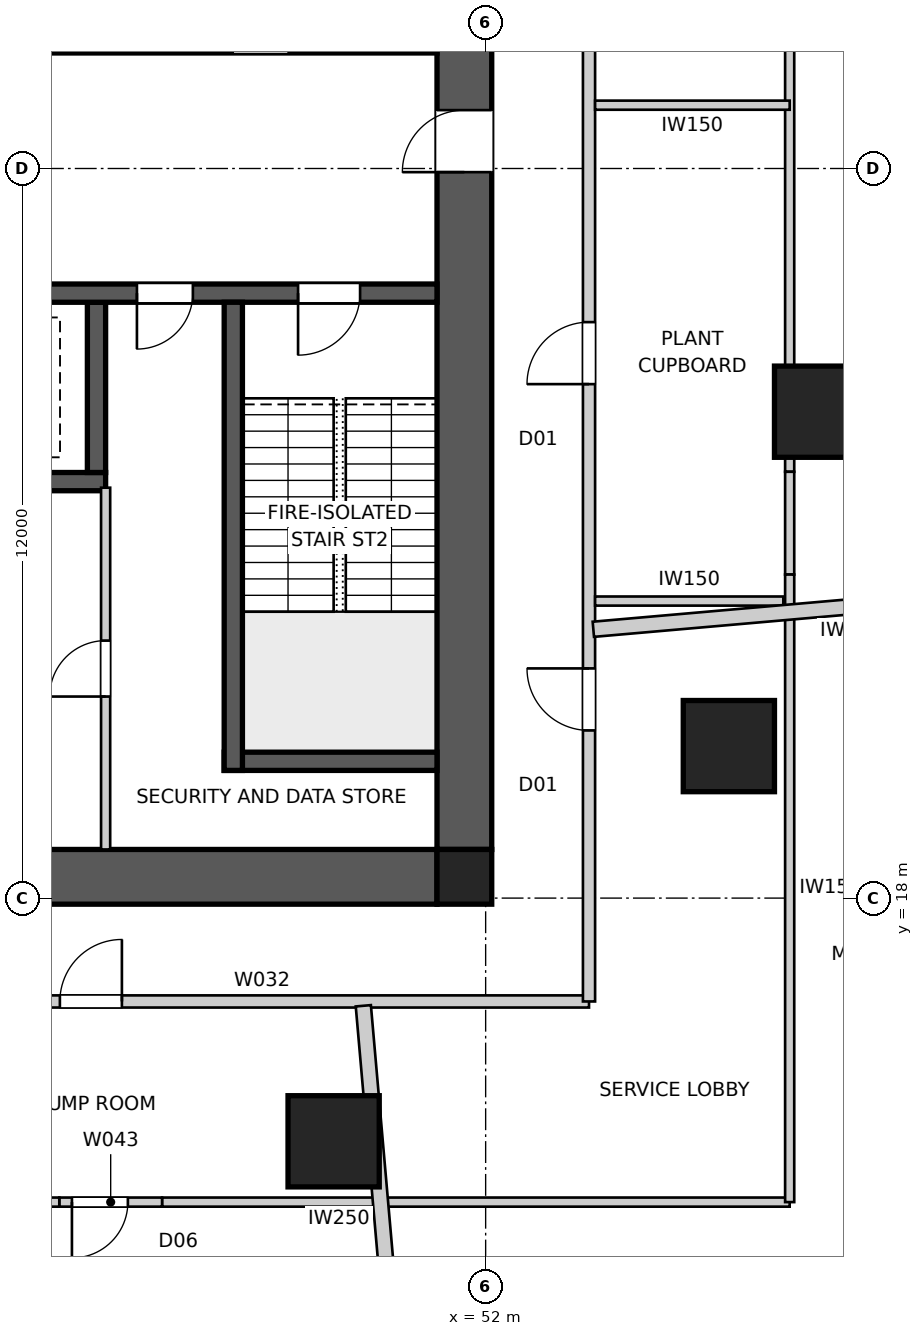
"""IFC4 building model, lengths in metres.
Left out: names, types, materials, properties, quantities, classifications, styles, units other than length and angle.
Written with IfcOpenShell. Run it as: python <this file> out.ifc"""

import sys

from ifc_helpers import new_model, si_unit, direction, frame, frame_2d, origin, origin_2d, place, context, subcontext, project, spatial, polyline, rectangle, outline, extrude, element, fill, save


model = new_model("IFC4")
c1 = context("Model", 3, precision=1e-05, world=origin(), true_north=direction((0.0, 1.0)))
c2 = subcontext(c1, "Body", "Model", "MODEL_VIEW")
j1 = project(units=[si_unit("LENGTHUNIT", "METRE"), si_unit("PLANEANGLEUNIT", "RADIAN")], contexts=[c1])
p1 = place(None, origin())
s1 = spatial("IfcSite", under=j1, at=p1, CompositionType="ELEMENT")
p2 = place(p1, origin())
s2 = spatial("IfcBuilding", under=s1, at=p2, CompositionType="ELEMENT")
p3 = place(p2, frame((0.0, 0.0, 42.2)))
s3 = spatial("IfcBuildingStorey", under=s2, at=p3, CompositionType="ELEMENT", Elevation=42.2)
p4 = place(p3, frame((51.2, 18.35, 0.0), z_axis=(0.0, 0.0, 1.0), x_axis=(-1.0, 0.0, 0.0)))
e1 = element("IfcWall", 1, at=p4, inside=s3, PredefinedType="SHEAR", context=c2, shape_type="SweptSolid", body=[
    extrude(outline(polyline([(0.0, -0.45), (22.4, -0.45), (22.4, -0.025), (22.85, -0.025), (22.85, 0.025), (22.4, 0.025), (22.4, 0.45), (0.0, 0.45), (0.0, 0.025), (-0.45, 0.025), (-0.45, -0.025), (0.0, -0.025), (0.0, -0.45)])), origin(), (0.0, 0.0, 1.0), 5.0),
])
p5 = place(p3, frame((51.65, 18.8, 0.0), z_axis=(0.0, 0.0, 1.0), x_axis=(0.0, 1.0, 0.0)))
e2 = element("IfcWall", 2, at=p5, inside=s3, PredefinedType="SHEAR", context=c2, shape_type="SweptSolid", body=[
    extrude(outline(polyline([(0.0, -0.45), (22.4, -0.45), (22.4, -0.025), (22.85, -0.025), (22.85, 0.025), (22.4, 0.025), (22.4, 0.45), (0.0, 0.45), (0.0, 0.025), (-0.45, 0.025), (-0.45, -0.025), (0.0, -0.025), (0.0, -0.45)])), origin(), (0.0, 0.0, 1.0), 5.0),
])
p6 = place(p5, frame((11.14, 0.0, 0.0)))
e3 = element("IfcOpeningElement", 3, at=p6, cuts=e2, PredefinedType="OPENING", context=c2, shape_type="SweptSolid", body=[
    extrude(rectangle(XDim=1.02, YDim=2.4, at=frame_2d((0.51, 1.2))), frame((0.0, 0.46, 0.0), z_axis=(0.0, -1.0, 0.0), x_axis=(1.0, 0.0, 0.0)), (0.0, 0.0, 1.0), 0.92),
])
p7 = place(p3, frame((28.8, 32.05, 0.0), z_axis=(0.0, 0.0, 1.0), x_axis=(1.0, 0.0, 0.0)))
e4 = element("IfcWall", 4, at=p7, inside=s3, PredefinedType="SHEAR", context=c2, shape_type="SweptSolid", body=[
    extrude(rectangle(XDim=22.4, YDim=0.3, at=frame_2d((11.2, 0.0))), origin(), (0.0, 0.0, 1.0), 5.0),
])
p8 = place(p7, frame((19.04, 0.0, 0.0)))
e5 = element("IfcOpeningElement", 5, at=p8, cuts=e4, PredefinedType="OPENING", context=c2, shape_type="SweptSolid", body=[
    extrude(rectangle(XDim=0.92, YDim=2.1, at=frame_2d((0.46, 1.05))), frame((0.0, 0.16, 0.0), z_axis=(0.0, -1.0, 0.0), x_axis=(1.0, 0.0, 0.0)), (0.0, 0.0, 1.0), 0.32),
])
p9 = place(p7, frame((1.265, 0.0, 0.0)))
e6 = element("IfcOpeningElement", 6, at=p9, cuts=e4, PredefinedType="OPENING", context=c2, shape_type="SweptSolid", body=[
    extrude(rectangle(XDim=1.02, YDim=2.1, at=frame_2d((0.51, 1.05))), frame((0.0, 0.16, 0.0), z_axis=(0.0, -1.0, 0.0), x_axis=(1.0, 0.0, 0.0)), (0.0, 0.0, 1.0), 0.32),
])
p10 = place(p7, frame((4.015, 0.0, 0.0)))
e7 = element("IfcOpeningElement", 7, at=p10, cuts=e4, PredefinedType="OPENING", context=c2, shape_type="SweptSolid", body=[
    extrude(rectangle(XDim=0.92, YDim=2.1, at=frame_2d((0.46, 1.05))), frame((0.0, 0.16, 0.0), z_axis=(0.0, -1.0, 0.0), x_axis=(1.0, 0.0, 0.0)), (0.0, 0.0, 1.0), 0.32),
])
p11 = place(p7, frame((6.45, 0.0, 0.0)))
e8 = element("IfcOpeningElement", 8, at=p11, cuts=e4, PredefinedType="OPENING", context=c2, shape_type="SweptSolid", body=[
    extrude(rectangle(XDim=1.1, YDim=2.1, at=frame_2d((0.55, 1.05))), frame((0.0, 0.16, 0.0), z_axis=(0.0, -1.0, 0.0), x_axis=(1.0, 0.0, 0.0)), (0.0, 0.0, 1.0), 0.32),
])
p12 = place(p7, frame((9.25, 0.0, 0.0)))
e9 = element("IfcOpeningElement", 9, at=p12, cuts=e4, PredefinedType="OPENING", context=c2, shape_type="SweptSolid", body=[
    extrude(rectangle(XDim=1.1, YDim=2.1, at=frame_2d((0.55, 1.05))), frame((0.0, 0.16, 0.0), z_axis=(0.0, -1.0, 0.0), x_axis=(1.0, 0.0, 0.0)), (0.0, 0.0, 1.0), 0.32),
])
p13 = place(p7, frame((14.85, 0.0, 0.0)))
e10 = element("IfcOpeningElement", 10, at=p13, cuts=e4, PredefinedType="OPENING", context=c2, shape_type="SweptSolid", body=[
    extrude(rectangle(XDim=1.1, YDim=2.1, at=frame_2d((0.55, 1.05))), frame((0.0, 0.16, 0.0), z_axis=(0.0, -1.0, 0.0), x_axis=(1.0, 0.0, 0.0)), (0.0, 0.0, 1.0), 0.32),
])
p14 = place(p3, frame((51.2, 27.95, 0.0), z_axis=(0.0, 0.0, 1.0), x_axis=(-1.0, 0.0, 0.0)))
e11 = element("IfcWall", 11, at=p14, inside=s3, PredefinedType="SHEAR", context=c2, shape_type="SweptSolid", body=[
    extrude(rectangle(XDim=22.4, YDim=0.3, at=frame_2d((11.2, 0.0))), origin(), (0.0, 0.0, 1.0), 5.0),
])
p15 = place(p14, frame((19.04, 0.0, 0.0)))
e12 = element("IfcOpeningElement", 12, at=p15, cuts=e11, PredefinedType="OPENING", context=c2, shape_type="SweptSolid", body=[
    extrude(rectangle(XDim=0.92, YDim=2.1, at=frame_2d((0.46, 1.05))), frame((0.0, 0.16, 0.0), z_axis=(0.0, -1.0, 0.0), x_axis=(1.0, 0.0, 0.0)), (0.0, 0.0, 1.0), 0.32),
])
p16 = place(p14, frame((1.265, 0.0, 0.0)))
e13 = element("IfcOpeningElement", 13, at=p16, cuts=e11, PredefinedType="OPENING", context=c2, shape_type="SweptSolid", body=[
    extrude(rectangle(XDim=1.02, YDim=2.1, at=frame_2d((0.51, 1.05))), frame((0.0, 0.16, 0.0), z_axis=(0.0, -1.0, 0.0), x_axis=(1.0, 0.0, 0.0)), (0.0, 0.0, 1.0), 0.32),
])
p17 = place(p14, frame((4.015, 0.0, 0.0)))
e14 = element("IfcOpeningElement", 14, at=p17, cuts=e11, PredefinedType="OPENING", context=c2, shape_type="SweptSolid", body=[
    extrude(rectangle(XDim=0.92, YDim=2.1, at=frame_2d((0.46, 1.05))), frame((0.0, 0.16, 0.0), z_axis=(0.0, -1.0, 0.0), x_axis=(1.0, 0.0, 0.0)), (0.0, 0.0, 1.0), 0.32),
])
p18 = place(p14, frame((14.85, 0.0, 0.0)))
e15 = element("IfcOpeningElement", 15, at=p18, cuts=e11, PredefinedType="OPENING", context=c2, shape_type="SweptSolid", body=[
    extrude(rectangle(XDim=1.1, YDim=2.1, at=frame_2d((0.55, 1.05))), frame((0.0, 0.16, 0.0), z_axis=(0.0, -1.0, 0.0), x_axis=(1.0, 0.0, 0.0)), (0.0, 0.0, 1.0), 0.32),
])
p19 = place(p3, frame((45.75, 24.85, 0.0), z_axis=(0.0, 0.0, 1.0), x_axis=(-1.0, 0.0, 0.0)))
e16 = element("IfcWall", 16, at=p19, inside=s3, PredefinedType="SHEAR", context=c2, shape_type="SweptSolid", body=[
    extrude(rectangle(XDim=11.5, YDim=0.3, at=frame_2d((5.75, 0.0))), origin(), (0.0, 0.0, 1.0), 5.0),
])
p20 = place(p3, frame((45.6, 27.8, 0.0), z_axis=(0.0, 0.0, 1.0), x_axis=(0.0, -1.0, 0.0)))
e17 = element("IfcWall", 17, at=p20, inside=s3, PredefinedType="SHEAR", context=c2, shape_type="SweptSolid", body=[
    extrude(rectangle(XDim=2.8, YDim=0.3, at=frame_2d((1.4, 0.0))), origin(), (0.0, 0.0, 1.0), 5.0),
])
p21 = place(p3, frame((47.85, 27.8, 0.0), z_axis=(0.0, 0.0, 1.0), x_axis=(0.0, -1.0, 0.0)))
e18 = element("IfcWall", 18, at=p21, inside=s3, PredefinedType="SHEAR", context=c2, shape_type="SweptSolid", body=[
    extrude(rectangle(XDim=7.7, YDim=0.3, at=frame_2d((3.85, 0.0))), origin(), (0.0, 0.0, 1.0), 5.0),
])
p22 = place(p3, frame((51.2, 20.25, 0.0), z_axis=(0.0, 0.0, 1.0), x_axis=(-1.0, 0.0, 0.0)))
e19 = element("IfcWall", 19, at=p22, inside=s3, PredefinedType="SHEAR", context=c2, shape_type="SweptSolid", body=[
    extrude(rectangle(XDim=3.5, YDim=0.3, at=frame_2d((1.75, 0.0))), origin(), (0.0, 0.0, 1.0), 5.0),
])
p23 = place(p3, frame((51.65, 18.35, 0.0), z_axis=(0.0, 0.0, 1.0), x_axis=(1.0, 0.0, 0.0)))
e20 = element("IfcColumn", 20, at=p23, inside=s3, PredefinedType="COLUMN", context=c2, shape_type="SweptSolid", body=[
    extrude(rectangle(XDim=0.9, YDim=0.9, at=origin_2d()), origin(), (0.0, 0.0, 1.0), 5.0),
])
for number, where, z_axis, x_axis in (
    (21, (57.5, 26.0, 0.0), (0.0, 0.0, 1.0), (1.0, 0.0, 0.0)),
    (22, (49.5, 14.0, 0.0), (0.0, 0.0, 1.0), (1.0, 0.0, 0.0)),
    (23, (56.0, 20.5, 0.0), (0.0, 0.0, 1.0), (1.0, 0.0, 0.0)),
):
    element("IfcColumn", number, at=place(p3, frame(where, z_axis=z_axis, x_axis=x_axis)), inside=s3, PredefinedType="COLUMN", context=c2, shape_type="SweptSolid", body=[
        extrude(rectangle(XDim=1.5, YDim=1.5, at=origin_2d()), origin(), (0.0, 0.0, 1.0), 5.0),
    ])
p24 = place(p3, frame((26.3, 16.3, 0.0), z_axis=(0.0, 0.0, 1.0), x_axis=(1.0, 0.0, 0.0)))
e24 = element("IfcWall", 24, at=p24, inside=s3, PredefinedType="PARTITIONING", context=c2, shape_type="SweptSolid", body=[
    extrude(rectangle(XDim=27.4, YDim=0.2, at=frame_2d((13.7, 0.0))), origin(), (0.0, 0.0, 1.0), 4.85),
])
p25 = place(p24, frame((18.698, 0.0, 0.0)))
e25 = element("IfcOpeningElement", 25, at=p25, cuts=e24, PredefinedType="OPENING", context=c2, shape_type="SweptSolid", body=[
    extrude(rectangle(XDim=1.02, YDim=2.34, at=frame_2d((0.51, 1.17))), frame((0.0, 0.11, 0.0), z_axis=(0.0, -1.0, 0.0), x_axis=(1.0, 0.0, 0.0)), (0.0, 0.0, 1.0), 0.22),
])
p26 = place(p24, frame((10.153, 0.0, 0.0)))
e26 = element("IfcOpeningElement", 26, at=p26, cuts=e24, PredefinedType="OPENING", context=c2, shape_type="SweptSolid", body=[
    extrude(rectangle(XDim=1.02, YDim=2.34, at=frame_2d((0.51, 1.17))), frame((0.0, 0.11, 0.0), z_axis=(0.0, -1.0, 0.0), x_axis=(1.0, 0.0, 0.0)), (0.0, 0.0, 1.0), 0.22),
])
p27 = place(p24, frame((4.458, 0.0, 0.0)))
e27 = element("IfcOpeningElement", 27, at=p27, cuts=e24, PredefinedType="OPENING", context=c2, shape_type="SweptSolid", body=[
    extrude(rectangle(XDim=1.02, YDim=2.34, at=frame_2d((0.51, 1.17))), frame((0.0, 0.11, 0.0), z_axis=(0.0, -1.0, 0.0), x_axis=(1.0, 0.0, 0.0)), (0.0, 0.0, 1.0), 0.22),
])
p28 = place(p3, frame((53.7, 16.3, 0.0), z_axis=(0.0, 0.0, 1.0), x_axis=(0.0, 1.0, 0.0)))
e28 = element("IfcWall", 28, at=p28, inside=s3, PredefinedType="PARTITIONING", context=c2, shape_type="SweptSolid", body=[
    extrude(rectangle(XDim=27.4, YDim=0.2, at=frame_2d((13.7, 0.0))), origin(), (0.0, 0.0, 1.0), 4.85),
])
p29 = place(p28, frame((18.698, 0.0, 0.0)))
e29 = element("IfcOpeningElement", 29, at=p29, cuts=e28, PredefinedType="OPENING", context=c2, shape_type="SweptSolid", body=[
    extrude(rectangle(XDim=1.02, YDim=2.34, at=frame_2d((0.51, 1.17))), frame((0.0, 0.11, 0.0), z_axis=(0.0, -1.0, 0.0), x_axis=(1.0, 0.0, 0.0)), (0.0, 0.0, 1.0), 0.22),
])
p30 = place(p28, frame((10.153, 0.0, 0.0)))
e30 = element("IfcOpeningElement", 30, at=p30, cuts=e28, PredefinedType="OPENING", context=c2, shape_type="SweptSolid", body=[
    extrude(rectangle(XDim=1.02, YDim=2.34, at=frame_2d((0.51, 1.17))), frame((0.0, 0.11, 0.0), z_axis=(0.0, -1.0, 0.0), x_axis=(1.0, 0.0, 0.0)), (0.0, 0.0, 1.0), 0.22),
])
p31 = place(p28, frame((4.458, 0.0, 0.0)))
e31 = element("IfcOpeningElement", 31, at=p31, cuts=e28, PredefinedType="OPENING", context=c2, shape_type="SweptSolid", body=[
    extrude(rectangle(XDim=1.02, YDim=2.34, at=frame_2d((0.51, 1.17))), frame((0.0, 0.11, 0.0), z_axis=(0.0, -1.0, 0.0), x_axis=(1.0, 0.0, 0.0)), (0.0, 0.0, 1.0), 0.22),
])
p32 = place(p3, frame((50.591, 9.344, 0.0), z_axis=(0.0, 0.0, 1.0), x_axis=(-0.087152488477, 0.996194982798, 0.0)))
e32 = element("IfcWall", 32, at=p32, inside=s3, PredefinedType="PARTITIONING", context=c2, shape_type="SweptSolid", body=[
    extrude(rectangle(XDim=6.911, YDim=0.25, at=frame_2d((3.456, 0.0))), origin(), (0.0, 0.0, 1.0), 4.85),
])
p33 = place(p3, frame((62.181, 23.157, 0.0), z_axis=(0.0, 0.0, 1.0), x_axis=(-0.996194000005, -0.087163721544, 0.0)))
e33 = element("IfcWall", 33, at=p33, inside=s3, PredefinedType="PARTITIONING", context=c2, shape_type="SweptSolid", body=[
    extrude(rectangle(XDim=8.442, YDim=0.25, at=frame_2d((4.221, 0.0))), origin(), (0.0, 0.0, 1.0), 4.85),
])
p34 = place(p3, frame((45.75, 18.8, 0.0), z_axis=(0.0, 0.0, 1.0), x_axis=(0.0, 1.0, 0.0)))
e34 = element("IfcWall", 34, at=p34, inside=s3, PredefinedType="SOLIDWALL", context=c2, shape_type="SweptSolid", body=[
    extrude(rectangle(XDim=5.95, YDim=0.15, at=frame_2d((2.975, 0.0))), origin(), (0.0, 0.0, 1.0), 4.85),
])
p35 = place(p34, frame((2.515, 0.0, 0.0)))
e35 = element("IfcOpeningElement", 35, at=p35, cuts=e34, PredefinedType="OPENING", context=c2, shape_type="SweptSolid", body=[
    extrude(rectangle(XDim=0.92, YDim=2.1, at=frame_2d((0.46, 1.05))), frame((0.0, 0.085, 0.0), z_axis=(0.0, -1.0, 0.0), x_axis=(1.0, 0.0, 0.0)), (0.0, 0.0, 1.0), 0.17),
])
p36 = place(p3, frame((57.0, 13.0, 0.0), z_axis=(0.0, 0.0, 1.0), x_axis=(-1.0, 0.0, 0.0)))
e36 = element("IfcWall", 36, at=p36, inside=s3, PredefinedType="SOLIDWALL", context=c2, shape_type="SweptSolid", body=[
    extrude(rectangle(XDim=10.322, YDim=0.15, at=frame_2d((5.161, 0.0))), origin(), (0.0, 0.0, 1.0), 4.85),
])
p37 = place(p3, frame((46.678, 13.0, 0.0), z_axis=(0.0, 0.0, 1.0), x_axis=(-1.0, 0.0, 0.0)))
e37 = element("IfcWall", 37, at=p37, inside=s3, PredefinedType="SOLIDWALL", context=c2, shape_type="SweptSolid", body=[
    extrude(rectangle(XDim=1.69, YDim=0.15, at=frame_2d((0.845, 0.0))), origin(), (0.0, 0.0, 1.0), 3.85),
])
p38 = place(p37, frame((0.562, 0.0, 0.0)))
e38 = element("IfcOpeningElement", 38, at=p38, cuts=e37, PredefinedType="OPENING", context=c2, shape_type="SweptSolid", body=[
    extrude(rectangle(XDim=0.92, YDim=2.1, at=frame_2d((0.46, 1.05))), frame((0.0, 0.085, 0.0), z_axis=(0.0, -1.0, 0.0), x_axis=(1.0, 0.0, 0.0)), (0.0, 0.0, 1.0), 0.17),
])
p39 = place(p3, frame((44.988, 13.0, 0.0), z_axis=(0.0, 0.0, 1.0), x_axis=(-1.0, 0.0, 0.0)))
e39 = element("IfcWall", 39, at=p39, inside=s3, PredefinedType="SOLIDWALL", context=c2, shape_type="SweptSolid", body=[
    extrude(rectangle(XDim=9.977, YDim=0.15, at=frame_2d((4.988, 0.0))), origin(), (0.0, 0.0, 1.0), 4.85),
])
p40 = place(p3, frame((53.8, 22.885, 0.0), z_axis=(0.0, 0.0, 1.0), x_axis=(1.0, 0.0, 0.0)))
e40 = element("IfcWall", 40, at=p40, inside=s3, PredefinedType="SOLIDWALL", context=c2, shape_type="SweptSolid", body=[
    extrude(rectangle(XDim=3.096, YDim=0.15, at=frame_2d((1.548, 0.0))), origin(), (0.0, 0.0, 1.0), 4.85),
])
p41 = place(p3, frame((57.0, 34.988, 0.0), z_axis=(0.0, 0.0, 1.0), x_axis=(0.0, -1.0, 0.0)))
e41 = element("IfcWall", 41, at=p41, inside=s3, PredefinedType="SOLIDWALL", context=c2, shape_type="SweptSolid", body=[
    extrude(rectangle(XDim=9.977, YDim=0.15, at=frame_2d((4.988, 0.0))), origin(), (0.0, 0.0, 1.0), 4.85),
])
p42 = place(p3, frame((57.0, 25.012, 0.0), z_axis=(0.0, 0.0, 1.0), x_axis=(0.0, -1.0, 0.0)))
e42 = element("IfcWall", 42, at=p42, inside=s3, PredefinedType="SOLIDWALL", context=c2, shape_type="SweptSolid", body=[
    extrude(rectangle(XDim=1.69, YDim=0.15, at=frame_2d((0.845, 0.0))), origin(), (0.0, 0.0, 1.0), 3.85),
])
p43 = place(p3, frame((57.0, 23.322, 0.0), z_axis=(0.0, 0.0, 1.0), x_axis=(0.0, -1.0, 0.0)))
e43 = element("IfcWall", 43, at=p43, inside=s3, PredefinedType="SOLIDWALL", context=c2, shape_type="SweptSolid", body=[
    extrude(rectangle(XDim=10.322, YDim=0.15, at=frame_2d((5.161, 0.0))), origin(), (0.0, 0.0, 1.0), 4.85),
])
p44 = place(p3, frame((57.0, 31.041, 0.0), z_axis=(0.0, 0.0, 1.0), x_axis=(-1.0, 0.0, 0.0)))
e44 = element("IfcWall", 44, at=p44, inside=s3, PredefinedType="SOLIDWALL", context=c2, shape_type="SweptSolid", body=[
    extrude(rectangle(XDim=3.2, YDim=0.15, at=frame_2d((1.6, 0.0))), origin(), (0.0, 0.0, 1.0), 4.85),
])
p45 = place(p16, origin())
e45 = element("IfcDoor", 45, at=p45, inside=s3, OperationType="SINGLE_SWING_RIGHT", PredefinedType="DOOR", context=c2, shape_type="SweptSolid", body=[
    extrude(rectangle(XDim=1.02, YDim=2.1, at=frame_2d((0.51, 1.05))), frame((0.0, 0.025, 0.0), z_axis=(0.0, -1.0, 0.0), x_axis=(1.0, 0.0, 0.0)), (0.0, 0.0, 1.0), 0.05),
])
fill(e13, e45)
p46 = place(p17, origin())
e46 = element("IfcDoor", 46, at=p46, inside=s3, OperationType="SINGLE_SWING_RIGHT", PredefinedType="DOOR", context=c2, shape_type="SweptSolid", body=[
    extrude(rectangle(XDim=0.92, YDim=2.1, at=frame_2d((0.46, 1.05))), frame((0.0, 0.025, 0.0), z_axis=(0.0, -1.0, 0.0), x_axis=(1.0, 0.0, 0.0)), (0.0, 0.0, 1.0), 0.05),
])
fill(e14, e46)
p47 = place(p25, origin())
e47 = element("IfcDoor", 47, at=p47, inside=s3, OperationType="SINGLE_SWING_RIGHT", PredefinedType="DOOR", context=c2, shape_type="SweptSolid", body=[
    extrude(rectangle(XDim=1.02, YDim=2.34, at=frame_2d((0.51, 1.17))), frame((0.0, 0.025, 0.0), z_axis=(0.0, -1.0, 0.0), x_axis=(1.0, 0.0, 0.0)), (0.0, 0.0, 1.0), 0.05),
])
fill(e25, e47)
p48 = place(p30, origin())
e48 = element("IfcDoor", 48, at=p48, inside=s3, OperationType="SINGLE_SWING_LEFT", PredefinedType="DOOR", context=c2, shape_type="SweptSolid", body=[
    extrude(rectangle(XDim=1.02, YDim=2.34, at=frame_2d((0.51, 1.17))), frame((0.0, 0.025, 0.0), z_axis=(0.0, -1.0, 0.0), x_axis=(1.0, 0.0, 0.0)), (0.0, 0.0, 1.0), 0.05),
])
fill(e30, e48)
p49 = place(p31, origin())
e49 = element("IfcDoor", 49, at=p49, inside=s3, OperationType="SINGLE_SWING_RIGHT", PredefinedType="DOOR", context=c2, shape_type="SweptSolid", body=[
    extrude(rectangle(XDim=1.02, YDim=2.34, at=frame_2d((0.51, 1.17))), frame((0.0, 0.025, 0.0), z_axis=(0.0, -1.0, 0.0), x_axis=(1.0, 0.0, 0.0)), (0.0, 0.0, 1.0), 0.05),
])
fill(e31, e49)
p50 = place(p35, origin())
e50 = element("IfcDoor", 50, at=p50, inside=s3, OperationType="SINGLE_SWING_LEFT", PredefinedType="DOOR", context=c2, shape_type="SweptSolid", body=[
    extrude(rectangle(XDim=0.92, YDim=2.1, at=frame_2d((0.46, 1.05))), frame((0.0, 0.025, 0.0), z_axis=(0.0, -1.0, 0.0), x_axis=(1.0, 0.0, 0.0)), (0.0, 0.0, 1.0), 0.05),
])
fill(e35, e50)
p51 = place(p38, origin())
e51 = element("IfcDoor", 51, at=p51, inside=s3, OperationType="SINGLE_SWING_RIGHT", PredefinedType="DOOR", context=c2, shape_type="SweptSolid", body=[
    extrude(rectangle(XDim=0.92, YDim=2.1, at=frame_2d((0.46, 1.05))), frame((0.0, 0.025, 0.0), z_axis=(0.0, -1.0, 0.0), x_axis=(1.0, 0.0, 0.0)), (0.0, 0.0, 1.0), 0.05),
])
fill(e38, e51)
p52 = place(p6, origin())
e52 = element("IfcDoor", 52, at=p52, inside=s3, OperationType="SINGLE_SWING_LEFT", PredefinedType="DOOR", context=c2, shape_type="SweptSolid", body=[
    extrude(rectangle(XDim=1.02, YDim=2.4, at=frame_2d((0.51, 1.2))), frame((0.0, 0.025, 0.0), z_axis=(0.0, -1.0, 0.0), x_axis=(1.0, 0.0, 0.0)), (0.0, 0.0, 1.0), 0.05),
])
fill(e3, e52)
save(model, sys.argv[1])
